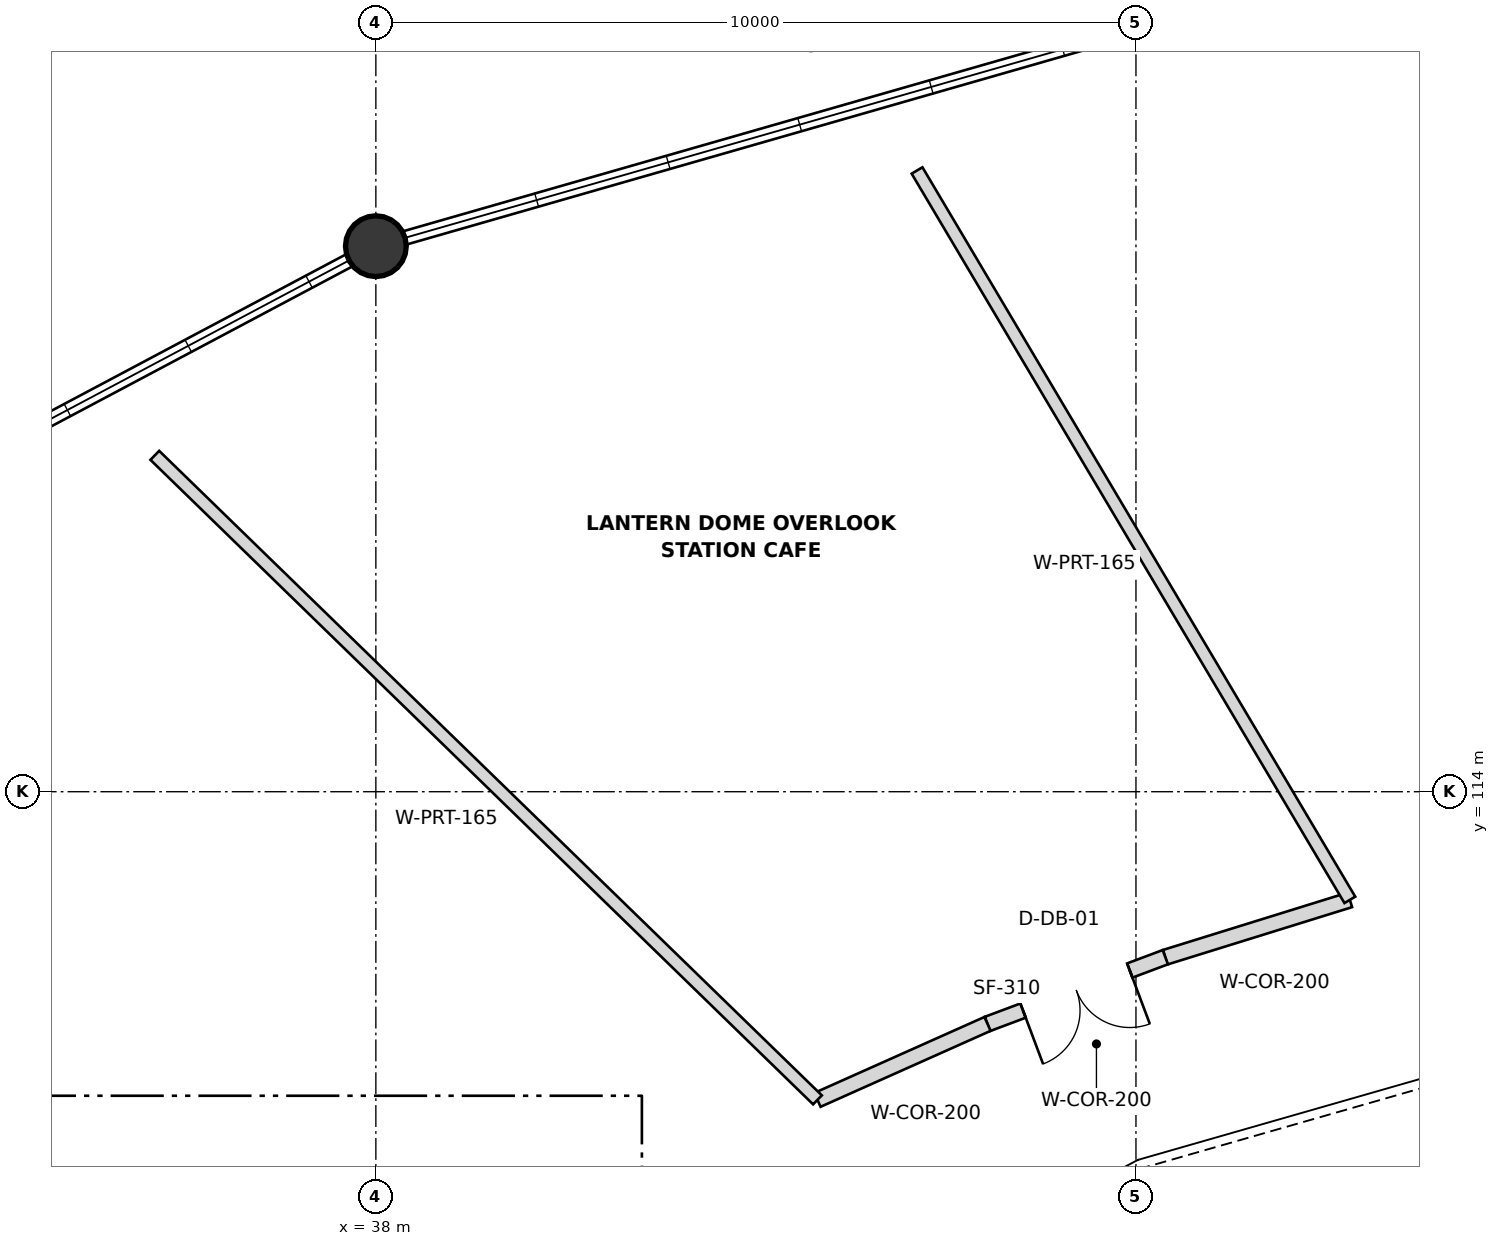
"""IFC4 building model, lengths in metres.
Left out: names, types, materials, properties, quantities, classifications, styles, units other than length and angle.
Written with IfcOpenShell. Run it as: python <this file> out.ifc"""

import sys

from ifc_helpers import new_model, si_unit, direction, frame, frame_2d, origin, origin_2d, place, context, subcontext, project, spatial, rectangle, circle, extrude, element, fill, save


model = new_model("IFC4")
c1 = context("Model", 3, precision=1e-05, world=origin(), true_north=direction((0.0, 1.0)))
c2 = subcontext(c1, "Body", "Model", "MODEL_VIEW")
j1 = project(units=[si_unit("LENGTHUNIT", "METRE"), si_unit("PLANEANGLEUNIT", "RADIAN")], contexts=[c1])
p1 = place(None, origin())
s1 = spatial("IfcSite", under=j1, at=p1, CompositionType="ELEMENT")
p2 = place(p1, origin())
s2 = spatial("IfcBuilding", under=s1, at=p2, CompositionType="ELEMENT")
p3 = place(p2, frame((0.0, 0.0, 9.6)))
s3 = spatial("IfcBuildingStorey", under=s2, at=p3, CompositionType="ELEMENT", Elevation=9.6)
p4 = place(p3, frame((38.0, 121.177, 0.0), z_axis=(0.0, 0.0, 1.0), x_axis=(1.0, 0.0, 0.0)))
e1 = element("IfcColumn", 1, at=p4, inside=s3, PredefinedType="COLUMN", context=c2, shape_type="SweptSolid", body=[
    extrude(circle(Radius=0.4, at=origin_2d()), origin(), (0.0, 0.0, 1.0), 4.8),
])
p5 = place(p3, frame((50.814, 112.577, 0.0), z_axis=(0.0, 0.0, 1.0), x_axis=(-0.955020069034, -0.296541173773, 0.0)))
e2 = element("IfcWall", 2, at=p5, inside=s3, PredefinedType="PARTITIONING", context=c2, shape_type="SweptSolid", body=[
    extrude(rectangle(XDim=2.542, YDim=0.2, at=frame_2d((1.271, 0.0))), origin(), (0.0, 0.0, 1.0), 3.1),
])
p6 = place(p3, frame((48.386, 111.823, 0.0), z_axis=(0.0, 0.0, 1.0), x_axis=(-0.936216677523, -0.351423295655, 0.0)))
e3 = element("IfcWall", 3, at=p6, inside=s3, PredefinedType="PARTITIONING", context=c2, shape_type="SweptSolid", body=[
    extrude(rectangle(XDim=2.498, YDim=0.2, at=frame_2d((1.249, 0.0))), origin(), (0.0, 0.0, 1.0), 3.1),
])
p7 = place(p6, frame((0.499, 0.0, 0.0)))
e4 = element("IfcOpeningElement", 4, at=p7, cuts=e3, PredefinedType="OPENING", context=c2, shape_type="SweptSolid", body=[
    extrude(rectangle(XDim=1.5, YDim=2.15, at=frame_2d((0.75, 1.075))), frame((0.0, 0.11, 0.0), z_axis=(0.0, -1.0, 0.0), x_axis=(1.0, 0.0, 0.0)), (0.0, 0.0, 1.0), 0.22),
])
p8 = place(p3, frame((46.047, 110.945, 0.0), z_axis=(0.0, 0.0, 1.0), x_axis=(-0.913086871575, -0.407765085505, 0.0)))
e5 = element("IfcWall", 5, at=p8, inside=s3, PredefinedType="PARTITIONING", context=c2, shape_type="SweptSolid", body=[
    extrude(rectangle(XDim=2.45, YDim=0.2, at=frame_2d((1.225, 0.0))), origin(), (0.0, 0.0, 1.0), 3.1),
])
p9 = place(p3, frame((50.814, 112.577, 0.0), z_axis=(0.0, 0.0, 1.0), x_axis=(-0.510280912803, 0.860007784865, 0.0)))
e6 = element("IfcWall", 6, at=p9, inside=s3, PredefinedType="PARTITIONING", context=c2, shape_type="SweptSolid", body=[
    extrude(rectangle(XDim=11.158, YDim=0.165, at=frame_2d((5.579, 0.0))), origin(), (0.0, 0.0, 1.0), 3.1),
])
p10 = place(p3, frame((43.81, 109.946, 0.0), z_axis=(0.0, 0.0, 1.0), x_axis=(-0.71686530552, 0.697211685029, 0.0)))
e7 = element("IfcWall", 7, at=p10, inside=s3, PredefinedType="PARTITIONING", context=c2, shape_type="SweptSolid", body=[
    extrude(rectangle(XDim=12.161, YDim=0.165, at=frame_2d((6.081, 0.0))), origin(), (0.0, 0.0, 1.0), 3.1),
])
p11 = place(p7, origin())
e8 = element("IfcDoor", 8, at=p11, inside=s3, OperationType="DOUBLE_DOOR_SINGLE_SWING", PredefinedType="DOOR", context=c2, shape_type="SweptSolid", body=[
    extrude(rectangle(XDim=1.5, YDim=2.15, at=frame_2d((0.75, 1.075))), frame((0.0, 0.025, 0.0), z_axis=(0.0, -1.0, 0.0), x_axis=(1.0, 0.0, 0.0)), (0.0, 0.0, 1.0), 0.05),
])
fill(e4, e8)
save(model, sys.argv[1])
